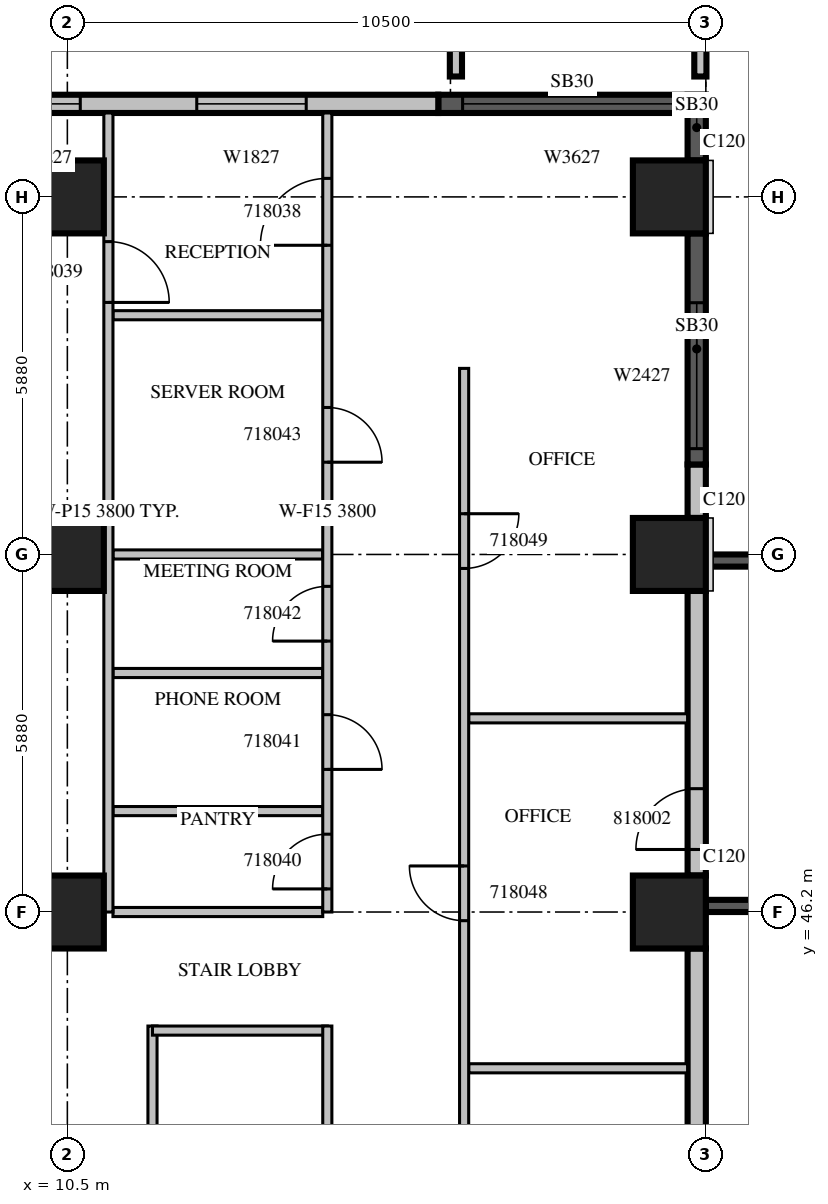
"""IFC4 building model, lengths in metres.
Left out: names, types, materials, properties, quantities, classifications, styles, units other than length and angle.
Written with IfcOpenShell. Run it as: python <this file> out.ifc"""

import sys

from ifc_helpers import new_model, si_unit, direction, frame, frame_2d, origin, origin_2d, place, context, subcontext, project, spatial, rectangle, extrude, source, transform, mapped, element, fill, save


model = new_model("IFC4")
c1 = context("Model", 3, precision=1e-05, world=origin(), true_north=direction((0.0, 1.0)))
c2 = subcontext(c1, "Body", "Model", "MODEL_VIEW")
j1 = project(units=[si_unit("LENGTHUNIT", "METRE"), si_unit("PLANEANGLEUNIT", "RADIAN")], contexts=[c1])
p1 = place(None, origin())
s1 = spatial("IfcSite", under=j1, at=p1, CompositionType="ELEMENT")
p2 = place(p1, origin())
s2 = spatial("IfcBuilding", under=s1, at=p2, CompositionType="ELEMENT")
p3 = place(p2, frame((0.0, 0.0, 86.7)))
s3 = spatial("IfcBuildingStorey", under=s2, at=p3, CompositionType="ELEMENT", Elevation=86.7)
m1 = source(origin(), c2, "Body", "SweptSolid", [
    extrude(rectangle(XDim=1.2, YDim=1.2, at=origin_2d()), origin(), (0.0, 0.0, 1.0), 4.2),
])
for number, where, z_axis, x_axis in (
    (1, (10.5, 46.2, 0.0), (0.0, 0.0, 1.0), (1.0, 0.0, 0.0)),
    (2, (20.4, 46.2, 0.0), (0.0, 0.0, 1.0), (1.0, 0.0, 0.0)),
    (3, (10.5, 52.08, 0.0), (0.0, 0.0, 1.0), (1.0, 0.0, 0.0)),
    (4, (20.4, 52.08, 0.0), (0.0, 0.0, 1.0), (1.0, 0.0, 0.0)),
    (5, (10.5, 57.96, 0.0), (0.0, 0.0, 1.0), (1.0, 0.0, 0.0)),
    (6, (20.4, 57.96, 0.0), (0.0, 0.0, 1.0), (1.0, 0.0, 0.0)),
):
    element("IfcColumn", number, at=place(p3, frame(where, z_axis=z_axis, x_axis=x_axis)), inside=s3, PredefinedType="COLUMN", context=c2, shape_type="MappedRepresentation", body=[
        mapped(m1, transform((0.0, 0.0, 0.0), scale=1.0)),
    ])
m2 = source(origin(), c2, "Body", "SweptSolid", [
    extrude(rectangle(XDim=7.2, YDim=0.3, at=frame_2d((3.6, 0.0))), origin(), (0.0, 0.0, 1.0), 3.8),
])
p4 = place(p3, frame((20.85, 38.4, 0.0), z_axis=(0.0, 0.0, 1.0), x_axis=(0.0, 1.0, 0.0)))
e7 = element("IfcWall", 7, at=p4, inside=s3, PredefinedType="STANDARD", context=c2, shape_type="MappedRepresentation", body=[
    mapped(m2, transform((0.0, 0.0, 0.0), scale=1.0)),
])
m3 = source(origin(), c2, "Body", "SweptSolid", [
    extrude(rectangle(XDim=2.4, YDim=2.7, at=frame_2d((1.2, 1.35))), frame((0.0, 0.16, 0.0), z_axis=(0.0, -1.0, 0.0), x_axis=(1.0, 0.0, 0.0)), (0.0, 0.0, 1.0), 0.32),
])
p5 = place(p4, frame((0.3, 0.0, 0.6)))
e8 = element("IfcOpeningElement", 8, at=p5, cuts=e7, PredefinedType="OPENING", context=c2, shape_type="MappedRepresentation", body=[
    mapped(m3, transform((0.0, 0.0, 0.0), scale=1.0)),
])
m4 = source(origin(), c2, "Body", "SweptSolid", [
    extrude(rectangle(XDim=4.68, YDim=0.3, at=frame_2d((2.34, 0.0))), origin(), (0.0, 0.0, 1.0), 3.8),
])
p6 = place(p3, frame((20.85, 46.8, 0.0), z_axis=(0.0, 0.0, 1.0), x_axis=(0.0, 1.0, 0.0)))
e9 = element("IfcWall", 9, at=p6, inside=s3, PredefinedType="STANDARD", context=c2, shape_type="MappedRepresentation", body=[
    mapped(m4, transform((0.0, 0.0, 0.0), scale=1.0)),
])
m5 = source(origin(), c2, "Body", "SweptSolid", [
    extrude(rectangle(XDim=1.0, YDim=2.1, at=frame_2d((0.5, 1.05))), frame((0.0, 0.16, 0.0), z_axis=(0.0, -1.0, 0.0), x_axis=(1.0, 0.0, 0.0)), (0.0, 0.0, 1.0), 0.32),
])
p7 = place(p6, frame((0.428, 0.0, 0.0)))
e10 = element("IfcOpeningElement", 10, at=p7, cuts=e9, PredefinedType="OPENING", context=c2, shape_type="MappedRepresentation", body=[
    mapped(m5, transform((0.0, 0.0, 0.0), scale=1.0)),
])
m6 = source(origin(), c2, "Body", "SweptSolid", [
    extrude(rectangle(XDim=0.88, YDim=0.3, at=frame_2d((0.44, 0.0))), origin(), (0.0, 0.0, 1.0), 3.8),
])
p8 = place(p3, frame((20.85, 52.68, 0.0), z_axis=(0.0, 0.0, 1.0), x_axis=(0.0, 1.0, 0.0)))
e11 = element("IfcWall", 11, at=p8, inside=s3, PredefinedType="STANDARD", context=c2, shape_type="MappedRepresentation", body=[
    mapped(m6, transform((0.0, 0.0, 0.0), scale=1.0)),
])
m7 = source(origin(), c2, "Body", "SweptSolid", [
    extrude(rectangle(XDim=3.8, YDim=0.3, at=frame_2d((1.9, 0.0))), origin(), (0.0, 0.0, 1.0), 3.8),
])
p9 = place(p3, frame((20.85, 53.56, 0.0), z_axis=(0.0, 0.0, 1.0), x_axis=(0.0, 1.0, 0.0)))
e12 = element("IfcWall", 12, at=p9, inside=s3, PredefinedType="SOLIDWALL", context=c2, shape_type="MappedRepresentation", body=[
    mapped(m7, transform((0.0, 0.0, 0.0), scale=1.0)),
])
p10 = place(p9, frame((0.26, 0.0, 0.6)))
e13 = element("IfcOpeningElement", 13, at=p10, cuts=e12, PredefinedType="OPENING", context=c2, shape_type="MappedRepresentation", body=[
    mapped(m3, transform((0.0, 0.0, 0.0), scale=1.0)),
])
m8 = source(origin(), c2, "Body", "SweptSolid", [
    extrude(rectangle(XDim=1.08, YDim=0.3, at=frame_2d((0.54, 0.0))), origin(), (0.0, 0.0, 1.0), 3.8),
])
p11 = place(p3, frame((20.85, 58.56, 0.0), z_axis=(0.0, 0.0, 1.0), x_axis=(0.0, 1.0, 0.0)))
e14 = element("IfcWall", 14, at=p11, inside=s3, PredefinedType="SOLIDWALL", context=c2, shape_type="MappedRepresentation", body=[
    mapped(m8, transform((0.0, 0.0, 0.0), scale=1.0)),
])
m9 = source(origin(), c2, "Body", "SweptSolid", [
    extrude(rectangle(XDim=4.4, YDim=0.3, at=frame_2d((2.2, 0.0))), origin(), (0.0, 0.0, 1.0), 3.8),
])
p12 = place(p3, frame((21.0, 59.49, 0.0), z_axis=(0.0, 0.0, 1.0), x_axis=(-1.0, 0.0, 0.0)))
e15 = element("IfcWall", 15, at=p12, inside=s3, PredefinedType="SOLIDWALL", context=c2, shape_type="MappedRepresentation", body=[
    mapped(m9, transform((0.0, 0.0, 0.0), scale=1.0)),
])
m10 = source(origin(), c2, "Body", "SweptSolid", [
    extrude(rectangle(XDim=3.6, YDim=2.7, at=frame_2d((1.8, 1.35))), frame((0.0, 0.16, 0.0), z_axis=(0.0, -1.0, 0.0), x_axis=(1.0, 0.0, 0.0)), (0.0, 0.0, 1.0), 0.32),
])
p13 = place(p12, frame((0.4, 0.0, 0.6)))
e16 = element("IfcOpeningElement", 16, at=p13, cuts=e15, PredefinedType="OPENING", context=c2, shape_type="MappedRepresentation", body=[
    mapped(m10, transform((0.0, 0.0, 0.0), scale=1.0)),
])
m11 = source(origin(), c2, "Body", "SweptSolid", [
    extrude(rectangle(XDim=8.2, YDim=0.3, at=frame_2d((4.1, 0.0))), origin(), (0.0, 0.0, 1.0), 3.8),
])
p14 = place(p3, frame((16.6, 59.49, 0.0), z_axis=(0.0, 0.0, 1.0), x_axis=(-1.0, 0.0, 0.0)))
e17 = element("IfcWall", 17, at=p14, inside=s3, PredefinedType="STANDARD", context=c2, shape_type="MappedRepresentation", body=[
    mapped(m11, transform((0.0, 0.0, 0.0), scale=1.0)),
])
m12 = source(origin(), c2, "Body", "SweptSolid", [
    extrude(rectangle(XDim=1.2, YDim=2.7, at=frame_2d((0.6, 1.35))), frame((0.0, 0.16, 0.0), z_axis=(0.0, -1.0, 0.0), x_axis=(1.0, 0.0, 0.0)), (0.0, 0.0, 1.0), 0.32),
])
p15 = place(p14, frame((5.888, 0.0, 0.6)))
e18 = element("IfcOpeningElement", 18, at=p15, cuts=e17, PredefinedType="OPENING", context=c2, shape_type="MappedRepresentation", body=[
    mapped(m12, transform((0.0, 0.0, 0.0), scale=1.0)),
])
m13 = source(origin(), c2, "Body", "SweptSolid", [
    extrude(rectangle(XDim=1.8, YDim=2.7, at=frame_2d((0.9, 1.35))), frame((0.0, 0.16, 0.0), z_axis=(0.0, -1.0, 0.0), x_axis=(1.0, 0.0, 0.0)), (0.0, 0.0, 1.0), 0.32),
])
p16 = place(p14, frame((2.172, 0.0, 0.6)))
e19 = element("IfcOpeningElement", 19, at=p16, cuts=e17, PredefinedType="OPENING", context=c2, shape_type="MappedRepresentation", body=[
    mapped(m13, transform((0.0, 0.0, 0.0), scale=1.0)),
])
m14 = source(origin(), c2, "Body", "SweptSolid", [
    extrude(rectangle(XDim=3.9, YDim=0.2, at=frame_2d((1.95, 0.0))), origin(), (0.0, 0.0, 1.0), 3.79),
])
p17 = place(p3, frame((21.0, 46.3, 0.0), z_axis=(0.0, 0.0, 1.0), x_axis=(1.0, 0.0, 0.0)))
e20 = element("IfcWall", 20, at=p17, inside=s3, PredefinedType="SOLIDWALL", context=c2, shape_type="MappedRepresentation", body=[
    mapped(m14, transform((0.0, 0.0, 0.0), scale=1.0)),
])
m15 = source(origin(), c2, "Body", "SweptSolid", [
    extrude(rectangle(XDim=2.4, YDim=2.7, at=frame_2d((1.2, 1.35))), frame((0.0, 0.11, 0.0), z_axis=(0.0, -1.0, 0.0), x_axis=(1.0, 0.0, 0.0)), (0.0, 0.0, 1.0), 0.22),
])
p18 = place(p17, frame((0.75, 0.0, 0.6)))
e21 = element("IfcOpeningElement", 21, at=p18, cuts=e20, PredefinedType="OPENING", context=c2, shape_type="MappedRepresentation", body=[
    mapped(m15, transform((0.0, 0.0, 0.0), scale=1.0)),
])
p19 = place(p3, frame((21.0, 51.98, 0.0), z_axis=(0.0, 0.0, 1.0), x_axis=(1.0, 0.0, 0.0)))
e22 = element("IfcWall", 22, at=p19, inside=s3, PredefinedType="SOLIDWALL", context=c2, shape_type="MappedRepresentation", body=[
    mapped(m14, transform((0.0, 0.0, 0.0), scale=1.0)),
])
p20 = place(p19, frame((0.75, 0.0, 0.6)))
e23 = element("IfcOpeningElement", 23, at=p20, cuts=e22, PredefinedType="OPENING", context=c2, shape_type="MappedRepresentation", body=[
    mapped(m15, transform((0.0, 0.0, 0.0), scale=1.0)),
])
m16 = source(origin(), c2, "Body", "SweptSolid", [
    extrude(rectangle(XDim=1.29, YDim=0.2, at=frame_2d((0.645, 0.0))), origin(), (0.0, 0.0, 1.0), 1.1),
])
for number, where, z_axis, x_axis in (
    (24, (16.89, 59.94, 0.0), (0.0, 0.0, 1.0), (0.0, 1.0, 0.0)),
    (25, (20.91, 61.23, 0.0), (0.0, 0.0, 1.0), (0.0, -1.0, 0.0)),
):
    element("IfcWall", number, at=place(p3, frame(where, z_axis=z_axis, x_axis=x_axis)), inside=s3, PredefinedType="PARAPET", context=c2, shape_type="MappedRepresentation", body=[
        mapped(m16, transform((0.0, 0.0, 0.0), scale=1.0)),
    ])
m17 = source(origin(), c2, "Body", "SweptSolid", [
    extrude(rectangle(XDim=6.45, YDim=0.15, at=frame_2d((3.225, 0.0))), origin(), (0.0, 0.0, 1.0), 3.8),
])
p21 = place(p3, frame((11.9, 44.325, 0.0), z_axis=(0.0, 0.0, 1.0), x_axis=(0.0, -1.0, 0.0)))
e26 = element("IfcWall", 26, at=p21, inside=s3, PredefinedType="PARTITIONING", context=c2, shape_type="MappedRepresentation", body=[
    mapped(m17, transform((0.0, 0.0, 0.0), scale=1.0)),
])
m18 = source(origin(), c2, "Body", "SweptSolid", [
    extrude(rectangle(XDim=2.875, YDim=0.15, at=frame_2d((1.438, 0.0))), origin(), (0.0, 0.0, 1.0), 3.8),
])
p22 = place(p3, frame((14.775, 44.25, 0.0), z_axis=(0.0, 0.0, 1.0), x_axis=(-1.0, 0.0, 0.0)))
e27 = element("IfcWall", 27, at=p22, inside=s3, PredefinedType="PARTITIONING", context=c2, shape_type="MappedRepresentation", body=[
    mapped(m18, transform((0.0, 0.0, 0.0), scale=1.0)),
])
p23 = place(p3, frame((14.775, 37.875, 0.0), z_axis=(0.0, 0.0, 1.0), x_axis=(0.0, 1.0, 0.0)))
e28 = element("IfcWall", 28, at=p23, inside=s3, PredefinedType="PARTITIONING", context=c2, shape_type="MappedRepresentation", body=[
    mapped(m17, transform((0.0, 0.0, 0.0), scale=1.0)),
])
m19 = source(origin(), c2, "Body", "SweptSolid", [
    extrude(rectangle(XDim=0.9, YDim=2.1, at=frame_2d((0.45, 1.05))), frame((0.0, 0.085, 0.0), z_axis=(0.0, -1.0, 0.0), x_axis=(1.0, 0.0, 0.0)), (0.0, 0.0, 1.0), 0.17),
])
p24 = place(p23, frame((2.737, 0.0, 0.0)))
e29 = element("IfcOpeningElement", 29, at=p24, cuts=e28, PredefinedType="OPENING", context=c2, shape_type="MappedRepresentation", body=[
    mapped(m19, transform((0.0, 0.0, 0.0), scale=1.0)),
])
m20 = source(origin(), c2, "Body", "SweptSolid", [
    extrude(rectangle(XDim=3.45, YDim=0.15, at=frame_2d((1.725, 0.0))), origin(), (0.0, 0.0, 1.0), 3.8),
])
for number, where, z_axis, x_axis in (
    (30, (14.7, 47.86, 0.0), (0.0, 0.0, 1.0), (-1.0, 0.0, 0.0)),
    (31, (14.7, 50.131, 0.0), (0.0, 0.0, 1.0), (-1.0, 0.0, 0.0)),
    (32, (14.7, 52.08, 0.0), (0.0, 0.0, 1.0), (-1.0, 0.0, 0.0)),
    (33, (14.7, 56.014, 0.0), (0.0, 0.0, 1.0), (-1.0, 0.0, 0.0)),
    (34, (14.7, 46.2, 0.0), (0.0, 0.0, 1.0), (-1.0, 0.0, 0.0)),
):
    element("IfcWall", number, at=place(p3, frame(where, z_axis=z_axis, x_axis=x_axis)), inside=s3, PredefinedType="PARTITIONING", context=c2, shape_type="MappedRepresentation", body=[
        mapped(m20, transform((0.0, 0.0, 0.0), scale=1.0)),
    ])
p25 = place(p3, frame((11.175, 46.2, 0.0), z_axis=(0.0, 0.0, 1.0), x_axis=(0.0, 1.0, 0.0)))
e35 = element("IfcWall", 35, at=p25, inside=s3, PredefinedType="PARTITIONING", context=c2, shape_type="SweptSolid", body=[
    extrude(rectangle(XDim=13.14, YDim=0.15, at=frame_2d((6.57, 0.0))), origin(), (0.0, 0.0, 1.0), 3.8),
])
m21 = source(origin(), c2, "Body", "SweptSolid", [
    extrude(rectangle(XDim=1.0, YDim=2.1, at=frame_2d((0.5, 1.05))), frame((0.0, 0.085, 0.0), z_axis=(0.0, -1.0, 0.0), x_axis=(1.0, 0.0, 0.0)), (0.0, 0.0, 1.0), 0.17),
])
p26 = place(p25, frame((10.024, 0.0, 0.0)))
e36 = element("IfcOpeningElement", 36, at=p26, cuts=e35, PredefinedType="OPENING", context=c2, shape_type="MappedRepresentation", body=[
    mapped(m21, transform((0.0, 0.0, 0.0), scale=1.0)),
])
m22 = source(origin(), c2, "Body", "SweptSolid", [
    extrude(rectangle(XDim=3.6, YDim=0.15, at=frame_2d((1.8, 0.0))), origin(), (0.0, 0.0, 1.0), 3.8),
])
for number, where, z_axis, x_axis in (
    (37, (17.1, 43.63, 0.0), (0.0, 0.0, 1.0), (1.0, 0.0, 0.0)),
    (38, (17.1, 49.385, 0.0), (0.0, 0.0, 1.0), (1.0, 0.0, 0.0)),
):
    element("IfcWall", number, at=place(p3, frame(where, z_axis=z_axis, x_axis=x_axis)), inside=s3, PredefinedType="PARTITIONING", context=c2, shape_type="MappedRepresentation", body=[
        mapped(m22, transform((0.0, 0.0, 0.0), scale=1.0)),
    ])
m23 = source(origin(), c2, "Body", "SweptSolid", [
    extrude(rectangle(XDim=13.14, YDim=0.15, at=frame_2d((6.57, 0.0))), origin(), (0.0, 0.0, 1.0), 3.8),
])
p27 = place(p3, frame((14.775, 46.2, 0.0), z_axis=(0.0, 0.0, 1.0), x_axis=(0.0, 1.0, 0.0)))
e39 = element("IfcWall", 39, at=p27, inside=s3, PredefinedType="PARTITIONING", context=c2, shape_type="MappedRepresentation", body=[
    mapped(m23, transform((0.0, 0.0, 0.0), scale=1.0)),
])
m24 = source(origin(), c2, "Body", "SweptSolid", [
    extrude(rectangle(XDim=1.1, YDim=2.1, at=frame_2d((0.55, 1.05))), frame((0.0, 0.085, 0.0), z_axis=(0.0, -1.0, 0.0), x_axis=(1.0, 0.0, 0.0)), (0.0, 0.0, 1.0), 0.17),
])
p28 = place(p27, frame((10.964, 0.0, 0.0)))
e40 = element("IfcOpeningElement", 40, at=p28, cuts=e39, PredefinedType="OPENING", context=c2, shape_type="MappedRepresentation", body=[
    mapped(m24, transform((0.0, 0.0, 0.0), scale=1.0)),
])
p29 = place(p27, frame((0.38, 0.0, 0.0)))
e41 = element("IfcOpeningElement", 41, at=p29, cuts=e39, PredefinedType="OPENING", context=c2, shape_type="MappedRepresentation", body=[
    mapped(m19, transform((0.0, 0.0, 0.0), scale=1.0)),
])
p30 = place(p27, frame((2.345, 0.0, 0.0)))
e42 = element("IfcOpeningElement", 42, at=p30, cuts=e39, PredefinedType="OPENING", context=c2, shape_type="MappedRepresentation", body=[
    mapped(m19, transform((0.0, 0.0, 0.0), scale=1.0)),
])
p31 = place(p27, frame((4.455, 0.0, 0.0)))
e43 = element("IfcOpeningElement", 43, at=p31, cuts=e39, PredefinedType="OPENING", context=c2, shape_type="MappedRepresentation", body=[
    mapped(m19, transform((0.0, 0.0, 0.0), scale=1.0)),
])
p32 = place(p27, frame((7.397, 0.0, 0.0)))
e44 = element("IfcOpeningElement", 44, at=p32, cuts=e39, PredefinedType="OPENING", context=c2, shape_type="MappedRepresentation", body=[
    mapped(m19, transform((0.0, 0.0, 0.0), scale=1.0)),
])
p33 = place(p3, frame((17.025, 55.14, 0.0), z_axis=(0.0, 0.0, 1.0), x_axis=(0.0, -1.0, 0.0)))
e45 = element("IfcWall", 45, at=p33, inside=s3, PredefinedType="PARTITIONING", context=c2, shape_type="SweptSolid", body=[
    extrude(rectangle(XDim=25.74, YDim=0.15, at=frame_2d((12.87, 0.0))), origin(), (0.0, 0.0, 1.0), 3.3),
])
p34 = place(p33, frame((23.383, 0.0, 0.0)))
e46 = element("IfcOpeningElement", 46, at=p34, cuts=e45, PredefinedType="OPENING", context=c2, shape_type="MappedRepresentation", body=[
    mapped(m21, transform((0.0, 0.0, 0.0), scale=1.0)),
])
p35 = place(p33, frame((20.071, 0.0, 0.0)))
e47 = element("IfcOpeningElement", 47, at=p35, cuts=e45, PredefinedType="OPENING", context=c2, shape_type="MappedRepresentation", body=[
    mapped(m21, transform((0.0, 0.0, 0.0), scale=1.0)),
])
p36 = place(p33, frame((17.728, 0.0, 0.0)))
e48 = element("IfcOpeningElement", 48, at=p36, cuts=e45, PredefinedType="OPENING", context=c2, shape_type="MappedRepresentation", body=[
    mapped(m21, transform((0.0, 0.0, 0.0), scale=1.0)),
])
p37 = place(p33, frame((13.975, 0.0, 0.0)))
e49 = element("IfcOpeningElement", 49, at=p37, cuts=e45, PredefinedType="OPENING", context=c2, shape_type="MappedRepresentation", body=[
    mapped(m19, transform((0.0, 0.0, 0.0), scale=1.0)),
])
p38 = place(p33, frame((8.182, 0.0, 0.0)))
e50 = element("IfcOpeningElement", 50, at=p38, cuts=e45, PredefinedType="OPENING", context=c2, shape_type="MappedRepresentation", body=[
    mapped(m19, transform((0.0, 0.0, 0.0), scale=1.0)),
])
p39 = place(p33, frame((2.39, 0.0, 0.0)))
e51 = element("IfcOpeningElement", 51, at=p39, cuts=e45, PredefinedType="OPENING", context=c2, shape_type="MappedRepresentation", body=[
    mapped(m19, transform((0.0, 0.0, 0.0), scale=1.0)),
])
m25 = source(origin(), c2, "Body", "SweptSolid", [
    extrude(rectangle(XDim=2.4, YDim=2.7, at=frame_2d((1.2, 1.35))), frame((0.0, 0.03, 0.0), z_axis=(0.0, -1.0, 0.0), x_axis=(1.0, 0.0, 0.0)), (0.0, 0.0, 1.0), 0.06),
])
p40 = place(p10, origin())
e52 = element("IfcWindow", 52, at=p40, inside=s3, PartitioningType="SINGLE_PANEL", PredefinedType="WINDOW", context=c2, shape_type="MappedRepresentation", body=[
    mapped(m25, transform((0.0, 0.0, 0.0), scale=1.0)),
])
fill(e13, e52)
m26 = source(origin(), c2, "Body", "SweptSolid", [
    extrude(rectangle(XDim=1.2, YDim=2.7, at=frame_2d((0.6, 1.35))), frame((0.0, 0.03, 0.0), z_axis=(0.0, -1.0, 0.0), x_axis=(1.0, 0.0, 0.0)), (0.0, 0.0, 1.0), 0.06),
])
p41 = place(p15, origin())
e53 = element("IfcWindow", 53, at=p41, inside=s3, PartitioningType="SINGLE_PANEL", PredefinedType="WINDOW", context=c2, shape_type="MappedRepresentation", body=[
    mapped(m26, transform((0.0, 0.0, 0.0), scale=1.0)),
])
fill(e18, e53)
m27 = source(origin(), c2, "Body", "SweptSolid", [
    extrude(rectangle(XDim=1.8, YDim=2.7, at=frame_2d((0.9, 1.35))), frame((0.0, 0.03, 0.0), z_axis=(0.0, -1.0, 0.0), x_axis=(1.0, 0.0, 0.0)), (0.0, 0.0, 1.0), 0.06),
])
p42 = place(p16, origin())
e54 = element("IfcWindow", 54, at=p42, inside=s3, PartitioningType="SINGLE_PANEL", PredefinedType="WINDOW", context=c2, shape_type="MappedRepresentation", body=[
    mapped(m27, transform((0.0, 0.0, 0.0), scale=1.0)),
])
fill(e19, e54)
m28 = source(origin(), c2, "Body", "SweptSolid", [
    extrude(rectangle(XDim=3.6, YDim=2.7, at=frame_2d((1.8, 1.35))), frame((0.0, 0.03, 0.0), z_axis=(0.0, -1.0, 0.0), x_axis=(1.0, 0.0, 0.0)), (0.0, 0.0, 1.0), 0.06),
])
p43 = place(p13, origin())
e55 = element("IfcWindow", 55, at=p43, inside=s3, PartitioningType="SINGLE_PANEL", PredefinedType="WINDOW", context=c2, shape_type="MappedRepresentation", body=[
    mapped(m28, transform((0.0, 0.0, 0.0), scale=1.0)),
])
fill(e16, e55)
m29 = source(origin(), c2, "Body", "SweptSolid", [
    extrude(rectangle(XDim=1.1, YDim=2.1, at=frame_2d((0.55, 1.05))), frame((0.0, 0.025, 0.0), z_axis=(0.0, -1.0, 0.0), x_axis=(1.0, 0.0, 0.0)), (0.0, 0.0, 1.0), 0.05),
])
p44 = place(p28, origin())
e56 = element("IfcDoor", 56, at=p44, inside=s3, OperationType="SINGLE_SWING_LEFT", PredefinedType="DOOR", context=c2, shape_type="MappedRepresentation", body=[
    mapped(m29, transform((0.0, 0.0, 0.0), scale=1.0)),
])
fill(e40, e56)
m30 = source(origin(), c2, "Body", "SweptSolid", [
    extrude(rectangle(XDim=1.0, YDim=2.1, at=frame_2d((0.5, 1.05))), frame((0.0, 0.025, 0.0), z_axis=(0.0, -1.0, 0.0), x_axis=(1.0, 0.0, 0.0)), (0.0, 0.0, 1.0), 0.05),
])
p45 = place(p26, origin())
e57 = element("IfcDoor", 57, at=p45, inside=s3, OperationType="SINGLE_SWING_RIGHT", PredefinedType="DOOR", context=c2, shape_type="MappedRepresentation", body=[
    mapped(m30, transform((0.0, 0.0, 0.0), scale=1.0)),
])
fill(e36, e57)
m31 = source(origin(), c2, "Body", "SweptSolid", [
    extrude(rectangle(XDim=0.9, YDim=2.1, at=frame_2d((0.45, 1.05))), frame((0.0, 0.025, 0.0), z_axis=(0.0, -1.0, 0.0), x_axis=(1.0, 0.0, 0.0)), (0.0, 0.0, 1.0), 0.05),
])
p46 = place(p29, origin())
e58 = element("IfcDoor", 58, at=p46, inside=s3, OperationType="SINGLE_SWING_LEFT", PredefinedType="DOOR", context=c2, shape_type="MappedRepresentation", body=[
    mapped(m31, transform((0.0, 0.0, 0.0), scale=1.0)),
])
fill(e41, e58)
p47 = place(p30, origin())
e59 = element("IfcDoor", 59, at=p47, inside=s3, OperationType="SINGLE_SWING_RIGHT", PredefinedType="DOOR", context=c2, shape_type="MappedRepresentation", body=[
    mapped(m31, transform((0.0, 0.0, 0.0), scale=1.0)),
])
fill(e42, e59)
p48 = place(p31, origin())
e60 = element("IfcDoor", 60, at=p48, inside=s3, OperationType="SINGLE_SWING_LEFT", PredefinedType="DOOR", context=c2, shape_type="MappedRepresentation", body=[
    mapped(m31, transform((0.0, 0.0, 0.0), scale=1.0)),
])
fill(e43, e60)
p49 = place(p32, origin())
e61 = element("IfcDoor", 61, at=p49, inside=s3, OperationType="SINGLE_SWING_RIGHT", PredefinedType="DOOR", context=c2, shape_type="MappedRepresentation", body=[
    mapped(m31, transform((0.0, 0.0, 0.0), scale=1.0)),
])
fill(e44, e61)
p50 = place(p38, origin())
e62 = element("IfcDoor", 62, at=p50, inside=s3, OperationType="SINGLE_SWING_RIGHT", PredefinedType="DOOR", context=c2, shape_type="MappedRepresentation", body=[
    mapped(m31, transform((0.0, 0.0, 0.0), scale=1.0)),
])
fill(e50, e62)
p51 = place(p39, origin())
e63 = element("IfcDoor", 63, at=p51, inside=s3, OperationType="SINGLE_SWING_LEFT", PredefinedType="DOOR", context=c2, shape_type="MappedRepresentation", body=[
    mapped(m31, transform((0.0, 0.0, 0.0), scale=1.0)),
])
fill(e51, e63)
p52 = place(p7, origin())
e64 = element("IfcDoor", 64, at=p52, inside=s3, OperationType="SINGLE_SWING_LEFT", PredefinedType="DOOR", context=c2, shape_type="MappedRepresentation", body=[
    mapped(m30, transform((0.0, 0.0, 0.0), scale=1.0)),
])
fill(e10, e64)
save(model, sys.argv[1])
